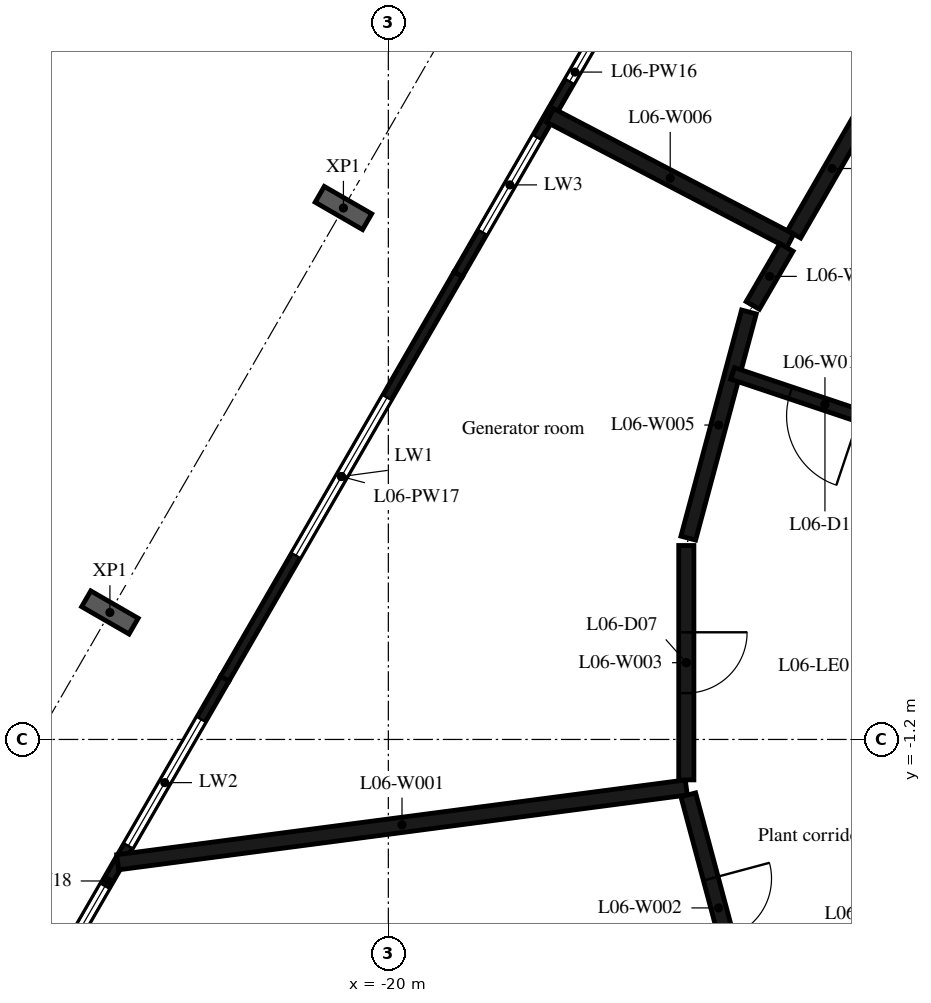
"""IFC4 building model, lengths in metres.
Left out: names, types, materials, properties, quantities, classifications, styles, units other than length and angle.
Written with IfcOpenShell. Run it as: python <this file> out.ifc"""

import sys

from ifc_helpers import new_model, si_unit, direction, frame, frame_2d, origin, origin_2d, place, context, subcontext, project, spatial, rectangle, i_section, extrude, element, fill, save


model = new_model("IFC4")
c1 = context("Model", 3, precision=1e-05, world=origin(), true_north=direction((0.0, 1.0)))
c2 = subcontext(c1, "Body", "Model", "MODEL_VIEW")
j1 = project(units=[si_unit("LENGTHUNIT", "METRE"), si_unit("PLANEANGLEUNIT", "RADIAN")], contexts=[c1])
p1 = place(None, origin())
s1 = spatial("IfcSite", under=j1, at=p1, CompositionType="ELEMENT")
p2 = place(p1, origin())
s2 = spatial("IfcBuilding", under=s1, at=p2, CompositionType="ELEMENT")
p3 = place(p2, frame((0.0, 0.0, 33.0)))
s3 = spatial("IfcBuildingStorey", under=s2, at=p3, CompositionType="ELEMENT", Elevation=33.0)
for number, where, z_axis, x_axis in (
    (1, (-20.739, 7.539, -0.45), (0.0, 0.0, 1.0), (0.5, 0.866, 0.0)),
    (2, (-24.579, 0.888, -0.45), (0.0, 0.0, 1.0), (0.5, 0.866, 0.0)),
):
    element("IfcColumn", number, at=place(p3, frame(where, z_axis=z_axis, x_axis=x_axis)), inside=s3, PredefinedType="COLUMN", context=c2, shape_type="SweptSolid", body=[
        extrude(i_section(OverallWidth=0.3, OverallDepth=0.9, WebThickness=0.019, FlangeThickness=0.035, FilletRadius=0.03, at=origin_2d()), origin(), (0.0, 0.0, 1.0), 5.4),
    ])
p4 = place(p3, frame((-15.011, 13.101, 0.0), z_axis=(0.0, 0.0, 1.0), x_axis=(-0.500005879718, -0.866022009101, 0.0)))
e3 = element("IfcWall", 3, at=p4, inside=s3, PredefinedType="STANDARD", context=c2, shape_type="SweptSolid", body=[
    extrude(rectangle(XDim=7.68, YDim=0.16, at=frame_2d((3.84, 0.0))), origin(), (0.0, 0.0, 1.0), 4.95),
])
p5 = place(p4, frame((1.017, 0.0, 1.0)))
e4 = element("IfcOpeningElement", 4, at=p5, cuts=e3, PredefinedType="OPENING", context=c2, shape_type="SweptSolid", body=[
    extrude(rectangle(XDim=3.0, YDim=2.2, at=frame_2d((1.5, 1.1))), frame((0.0, 0.09, 0.0), z_axis=(0.0, -1.0, 0.0), x_axis=(1.0, 0.0, 0.0)), (0.0, 0.0, 1.0), 0.18),
])
p6 = place(p4, frame((5.082, 0.0, 1.0)))
e5 = element("IfcOpeningElement", 5, at=p6, cuts=e3, PredefinedType="OPENING", context=c2, shape_type="SweptSolid", body=[
    extrude(rectangle(XDim=1.8, YDim=2.2, at=frame_2d((0.9, 1.1))), frame((0.0, 0.09, 0.0), z_axis=(0.0, -1.0, 0.0), x_axis=(1.0, 0.0, 0.0)), (0.0, 0.0, 1.0), 0.18),
])
p7 = place(p3, frame((-18.851, 6.449, 0.0), z_axis=(0.0, 0.0, 1.0), x_axis=(-0.499982037744, -0.86603577405, 0.0)))
e6 = element("IfcWall", 6, at=p7, inside=s3, PredefinedType="STANDARD", context=c2, shape_type="SweptSolid", body=[
    extrude(rectangle(XDim=7.68, YDim=0.16, at=frame_2d((3.84, 0.0))), origin(), (0.0, 0.0, 1.0), 4.95),
])
p8 = place(p7, frame((2.34, 0.0, 1.0)))
e7 = element("IfcOpeningElement", 7, at=p8, cuts=e6, PredefinedType="OPENING", context=c2, shape_type="SweptSolid", body=[
    extrude(rectangle(XDim=3.0, YDim=2.2, at=frame_2d((1.5, 1.1))), frame((0.0, 0.09, 0.0), z_axis=(0.0, -1.0, 0.0), x_axis=(1.0, 0.0, 0.0)), (0.0, 0.0, 1.0), 0.18),
])
p9 = place(p3, frame((-22.691, -0.202, 0.0), z_axis=(0.0, 0.0, 1.0), x_axis=(-0.500005879718, -0.866022009101, 0.0)))
e8 = element("IfcWall", 8, at=p9, inside=s3, PredefinedType="STANDARD", context=c2, shape_type="SweptSolid", body=[
    extrude(rectangle(XDim=7.68, YDim=0.16, at=frame_2d((3.84, 0.0))), origin(), (0.0, 0.0, 1.0), 4.95),
])
p10 = place(p9, frame((0.772, 0.0, 1.0)))
e9 = element("IfcOpeningElement", 9, at=p10, cuts=e8, PredefinedType="OPENING", context=c2, shape_type="SweptSolid", body=[
    extrude(rectangle(XDim=2.4, YDim=2.2, at=frame_2d((1.2, 1.1))), frame((0.0, 0.09, 0.0), z_axis=(0.0, -1.0, 0.0), x_axis=(1.0, 0.0, 0.0)), (0.0, 0.0, 1.0), 0.18),
])
p11 = place(p9, frame((3.937, 0.0, 1.0)))
e10 = element("IfcOpeningElement", 10, at=p11, cuts=e8, PredefinedType="OPENING", context=c2, shape_type="SweptSolid", body=[
    extrude(rectangle(XDim=3.0, YDim=2.2, at=frame_2d((1.5, 1.1))), frame((0.0, 0.09, 0.0), z_axis=(0.0, -1.0, 0.0), x_axis=(1.0, 0.0, 0.0)), (0.0, 0.0, 1.0), 0.18),
])
p12 = place(p3, frame((-15.1, -1.99, 0.0), z_axis=(0.0, 0.0, 1.0), x_axis=(-0.991465922176, -0.130366119689, 0.0)))
e11 = element("IfcWall", 11, at=p12, inside=s3, PredefinedType="PARTITIONING", context=c2, shape_type="SweptSolid", body=[
    extrude(rectangle(XDim=9.431, YDim=0.25, at=frame_2d((4.716, 0.0))), origin(), (0.0, 0.0, 1.0), 4.95),
])
p13 = place(p3, frame((-15.068, -2.111, 0.0), z_axis=(0.0, 0.0, 1.0), x_axis=(0.259059323171, -0.965861411942, 0.0)))
e12 = element("IfcWall", 12, at=p13, inside=s3, PredefinedType="PARTITIONING", context=c2, shape_type="SweptSolid", body=[
    extrude(rectangle(XDim=3.851, YDim=0.25, at=frame_2d((1.925, 0.0))), origin(), (0.0, 0.0, 1.0), 4.95),
])
p14 = place(p13, frame((1.425, 0.0, 0.0)))
e13 = element("IfcOpeningElement", 13, at=p14, cuts=e12, PredefinedType="OPENING", context=c2, shape_type="SweptSolid", body=[
    extrude(rectangle(XDim=1.0, YDim=2.1, at=frame_2d((0.5, 1.05))), frame((0.0, 0.135, 0.0), z_axis=(0.0, -1.0, 0.0), x_axis=(1.0, 0.0, 0.0)), (0.0, 0.0, 1.0), 0.27),
])
p15 = place(p3, frame((-15.1, 1.99, 0.0), z_axis=(0.0, 0.0, 1.0), x_axis=(0.0, -1.0, 0.0)))
e14 = element("IfcWall", 14, at=p15, inside=s3, PredefinedType="PARTITIONING", context=c2, shape_type="SweptSolid", body=[
    extrude(rectangle(XDim=3.855, YDim=0.25, at=frame_2d((1.927, 0.0))), origin(), (0.0, 0.0, 1.0), 4.95),
])
p16 = place(p15, frame((1.427, 0.0, 0.0)))
e15 = element("IfcOpeningElement", 15, at=p16, cuts=e14, PredefinedType="OPENING", context=c2, shape_type="SweptSolid", body=[
    extrude(rectangle(XDim=1.0, YDim=2.1, at=frame_2d((0.5, 1.05))), frame((0.0, 0.135, 0.0), z_axis=(0.0, -1.0, 0.0), x_axis=(1.0, 0.0, 0.0)), (0.0, 0.0, 1.0), 0.27),
])
p17 = place(p3, frame((-14.07, 5.83, 0.0), z_axis=(0.0, 0.0, 1.0), x_axis=(-0.259059323171, -0.965861411942, 0.0)))
e16 = element("IfcWall", 16, at=p17, inside=s3, PredefinedType="PARTITIONING", context=c2, shape_type="SweptSolid", body=[
    extrude(rectangle(XDim=3.851, YDim=0.25, at=frame_2d((1.925, 0.0))), origin(), (0.0, 0.0, 1.0), 4.95),
])
p18 = place(p3, frame((-13.39, 7.0, 0.0), z_axis=(0.0, 0.0, 1.0), x_axis=(-0.886352204499, 0.46301163007, 0.0)))
e17 = element("IfcWall", 17, at=p18, inside=s3, PredefinedType="PARTITIONING", context=c2, shape_type="SweptSolid", body=[
    extrude(rectangle(XDim=4.456, YDim=0.25, at=frame_2d((2.228, 0.0))), origin(), (0.0, 0.0, 1.0), 4.95),
])
p19 = place(p3, frame((-13.453, 6.892, 0.0), z_axis=(0.0, 0.0, 1.0), x_axis=(-0.502370413152, -0.864652512857, 0.0)))
e18 = element("IfcWall", 18, at=p19, inside=s3, PredefinedType="PARTITIONING", context=c2, shape_type="SweptSolid", body=[
    extrude(rectangle(XDim=1.103, YDim=0.25, at=frame_2d((0.552, 0.0))), origin(), (0.0, 0.0, 1.0), 4.95),
])
p20 = place(p3, frame((-12.08, 9.27, 0.0), z_axis=(0.0, 0.0, 1.0), x_axis=(-0.499821239653, -0.866128586522, 0.0)))
e19 = element("IfcWall", 19, at=p20, inside=s3, PredefinedType="PARTITIONING", context=c2, shape_type="SweptSolid", body=[
    extrude(rectangle(XDim=2.496, YDim=0.25, at=frame_2d((1.248, 0.0))), origin(), (0.0, 0.0, 1.0), 4.95),
])
p21 = place(p3, frame((-11.3, 3.8, 0.0), z_axis=(0.0, 0.0, 1.0), x_axis=(-0.94805712629, 0.318100118345, 0.0)))
e20 = element("IfcWall", 20, at=p21, inside=s3, PredefinedType="PARTITIONING", context=c2, shape_type="SweptSolid", body=[
    extrude(rectangle(XDim=3.207, YDim=0.2, at=frame_2d((1.603, 0.0))), origin(), (0.0, 0.0, 1.0), 4.95),
])
p22 = place(p21, frame((1.003, 0.0, 0.0)))
e21 = element("IfcOpeningElement", 21, at=p22, cuts=e20, PredefinedType="OPENING", context=c2, shape_type="SweptSolid", body=[
    extrude(rectangle(XDim=1.2, YDim=2.1, at=frame_2d((0.6, 1.05))), frame((0.0, 0.11, 0.0), z_axis=(0.0, -1.0, 0.0), x_axis=(1.0, 0.0, 0.0)), (0.0, 0.0, 1.0), 0.22),
])
p23 = place(p5, origin())
e22 = element("IfcWindow", 22, at=p23, inside=s3, PartitioningType="SINGLE_PANEL", PredefinedType="WINDOW", context=c2, shape_type="SweptSolid", body=[
    extrude(rectangle(XDim=3.0, YDim=2.2, at=frame_2d((1.5, 1.1))), frame((0.0, 0.03, 0.0), z_axis=(0.0, -1.0, 0.0), x_axis=(1.0, 0.0, 0.0)), (0.0, 0.0, 1.0), 0.06),
])
fill(e4, e22)
p24 = place(p6, origin())
e23 = element("IfcWindow", 23, at=p24, inside=s3, PartitioningType="SINGLE_PANEL", PredefinedType="WINDOW", context=c2, shape_type="SweptSolid", body=[
    extrude(rectangle(XDim=1.8, YDim=2.2, at=frame_2d((0.9, 1.1))), frame((0.0, 0.03, 0.0), z_axis=(0.0, -1.0, 0.0), x_axis=(1.0, 0.0, 0.0)), (0.0, 0.0, 1.0), 0.06),
])
fill(e5, e23)
p25 = place(p8, origin())
e24 = element("IfcWindow", 24, at=p25, inside=s3, PartitioningType="SINGLE_PANEL", PredefinedType="WINDOW", context=c2, shape_type="SweptSolid", body=[
    extrude(rectangle(XDim=3.0, YDim=2.2, at=frame_2d((1.5, 1.1))), frame((0.0, 0.03, 0.0), z_axis=(0.0, -1.0, 0.0), x_axis=(1.0, 0.0, 0.0)), (0.0, 0.0, 1.0), 0.06),
])
fill(e7, e24)
p26 = place(p10, origin())
e25 = element("IfcWindow", 25, at=p26, inside=s3, PartitioningType="SINGLE_PANEL", PredefinedType="WINDOW", context=c2, shape_type="SweptSolid", body=[
    extrude(rectangle(XDim=2.4, YDim=2.2, at=frame_2d((1.2, 1.1))), frame((0.0, 0.03, 0.0), z_axis=(0.0, -1.0, 0.0), x_axis=(1.0, 0.0, 0.0)), (0.0, 0.0, 1.0), 0.06),
])
fill(e9, e25)
p27 = place(p11, origin())
e26 = element("IfcWindow", 26, at=p27, inside=s3, PartitioningType="SINGLE_PANEL", PredefinedType="WINDOW", context=c2, shape_type="SweptSolid", body=[
    extrude(rectangle(XDim=3.0, YDim=2.2, at=frame_2d((1.5, 1.1))), frame((0.0, 0.03, 0.0), z_axis=(0.0, -1.0, 0.0), x_axis=(1.0, 0.0, 0.0)), (0.0, 0.0, 1.0), 0.06),
])
fill(e10, e26)
p28 = place(p14, origin())
e27 = element("IfcDoor", 27, at=p28, inside=s3, OperationType="SINGLE_SWING_LEFT", PredefinedType="DOOR", context=c2, shape_type="SweptSolid", body=[
    extrude(rectangle(XDim=1.0, YDim=2.1, at=frame_2d((0.5, 1.05))), frame((0.0, 0.025, 0.0), z_axis=(0.0, -1.0, 0.0), x_axis=(1.0, 0.0, 0.0)), (0.0, 0.0, 1.0), 0.05),
])
fill(e13, e27)
p29 = place(p16, origin())
e28 = element("IfcDoor", 28, at=p29, inside=s3, OperationType="SINGLE_SWING_LEFT", PredefinedType="DOOR", context=c2, shape_type="SweptSolid", body=[
    extrude(rectangle(XDim=1.0, YDim=2.1, at=frame_2d((0.5, 1.05))), frame((0.0, 0.025, 0.0), z_axis=(0.0, -1.0, 0.0), x_axis=(1.0, 0.0, 0.0)), (0.0, 0.0, 1.0), 0.05),
])
fill(e15, e28)
p30 = place(p22, origin())
e29 = element("IfcDoor", 29, at=p30, inside=s3, OperationType="SINGLE_SWING_LEFT", PredefinedType="DOOR", context=c2, shape_type="SweptSolid", body=[
    extrude(rectangle(XDim=1.2, YDim=2.1, at=frame_2d((0.6, 1.05))), frame((0.0, 0.025, 0.0), z_axis=(0.0, -1.0, 0.0), x_axis=(1.0, 0.0, 0.0)), (0.0, 0.0, 1.0), 0.05),
])
fill(e21, e29)
save(model, sys.argv[1])
